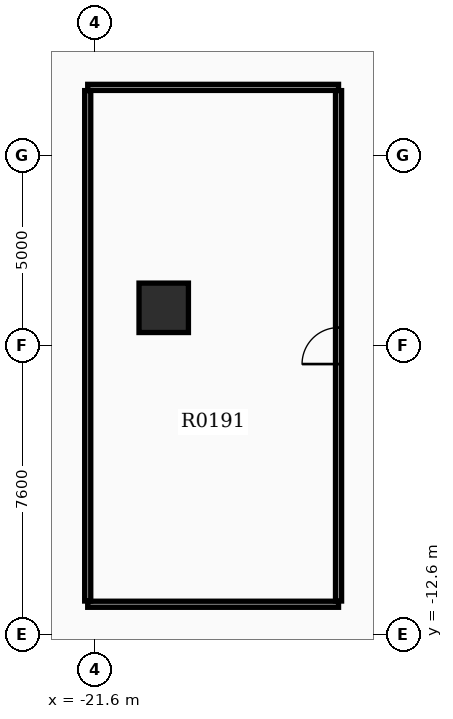
"""IFC4 building model, lengths in metres.
Left out: names, types, materials, properties, quantities, classifications, styles, units other than length and angle.
Written with IfcOpenShell. Run it as: python <this file> out.ifc"""

import sys

from ifc_helpers import new_model, si_unit, direction, frame, frame_2d, origin, origin_2d, place, context, subcontext, project, spatial, rectangle, extrude, element, fill, save


model = new_model("IFC4")
c1 = context("Model", 3, precision=1e-05, world=origin(), true_north=direction((0.0, 1.0)))
c2 = subcontext(c1, "Body", "Model", "MODEL_VIEW")
j1 = project(units=[si_unit("LENGTHUNIT", "METRE"), si_unit("PLANEANGLEUNIT", "RADIAN")], contexts=[c1])
p1 = place(None, origin())
s1 = spatial("IfcSite", under=j1, at=p1, CompositionType="ELEMENT")
p2 = place(p1, origin())
s2 = spatial("IfcBuilding", under=s1, at=p2, CompositionType="ELEMENT")
p3 = place(p2, frame((0.0, 0.0, 10.2)))
s3 = spatial("IfcBuildingStorey", under=s2, at=p3, CompositionType="ELEMENT", Elevation=10.2)
p4 = place(p3, frame((-19.8, -4.0, 0.0), z_axis=(0.0, 0.0, 1.0), x_axis=(1.0, 0.0, 0.0)))
e1 = element("IfcColumn", 1, at=p4, inside=s3, PredefinedType="COLUMN", context=c2, shape_type="SweptSolid", body=[
    extrude(rectangle(XDim=1.3, YDim=1.3, at=origin_2d()), origin(), (0.0, 0.0, 1.0), 4.5),
])
for number, where, z_axis, x_axis in (
    (2, (-21.8, -11.8, 0.0), (0.0, 0.0, 1.0), (1.0, 0.0, 0.0)),
    (3, (-21.8, 1.8, 0.0), (0.0, 0.0, 1.0), (1.0, 0.0, 0.0)),
):
    element("IfcWall", number, at=place(p3, frame(where, z_axis=z_axis, x_axis=x_axis)), inside=s3, PredefinedType="PARTITIONING", context=c2, shape_type="SweptSolid", body=[
        extrude(rectangle(XDim=6.6, YDim=0.16, at=frame_2d((3.3, 0.0))), origin(), (0.0, 0.0, 1.0), 3.32),
    ])
p5 = place(p3, frame((-21.8, -11.715, 0.0), z_axis=(0.0, 0.0, 1.0), x_axis=(0.0, 1.0, 0.0)))
e4 = element("IfcWall", 4, at=p5, inside=s3, PredefinedType="PARTITIONING", context=c2, shape_type="SweptSolid", body=[
    extrude(rectangle(XDim=13.43, YDim=0.16, at=frame_2d((6.715, 0.0))), origin(), (0.0, 0.0, 1.0), 3.32),
])
p6 = place(p3, frame((-15.2, -11.715, 0.0), z_axis=(0.0, 0.0, 1.0), x_axis=(0.0, 1.0, 0.0)))
e5 = element("IfcWall", 5, at=p6, inside=s3, PredefinedType="PARTITIONING", context=c2, shape_type="SweptSolid", body=[
    extrude(rectangle(XDim=13.43, YDim=0.16, at=frame_2d((6.715, 0.0))), origin(), (0.0, 0.0, 1.0), 3.32),
])
p7 = place(p6, frame((6.235, 0.0, 0.0)))
e6 = element("IfcOpeningElement", 6, at=p7, cuts=e5, PredefinedType="OPENING", context=c2, shape_type="SweptSolid", body=[
    extrude(rectangle(XDim=0.96, YDim=2.15, at=frame_2d((0.48, 1.075))), frame((0.0, 0.09, 0.0), z_axis=(0.0, -1.0, 0.0), x_axis=(1.0, 0.0, 0.0)), (0.0, 0.0, 1.0), 0.18),
])
p8 = place(p7, origin())
e7 = element("IfcDoor", 7, at=p8, inside=s3, OperationType="SINGLE_SWING_LEFT", PredefinedType="DOOR", context=c2, shape_type="SweptSolid", body=[
    extrude(rectangle(XDim=0.96, YDim=2.15, at=frame_2d((0.48, 1.075))), frame((0.0, 0.025, 0.0), z_axis=(0.0, -1.0, 0.0), x_axis=(1.0, 0.0, 0.0)), (0.0, 0.0, 1.0), 0.05),
])
fill(e6, e7)
save(model, sys.argv[1])
